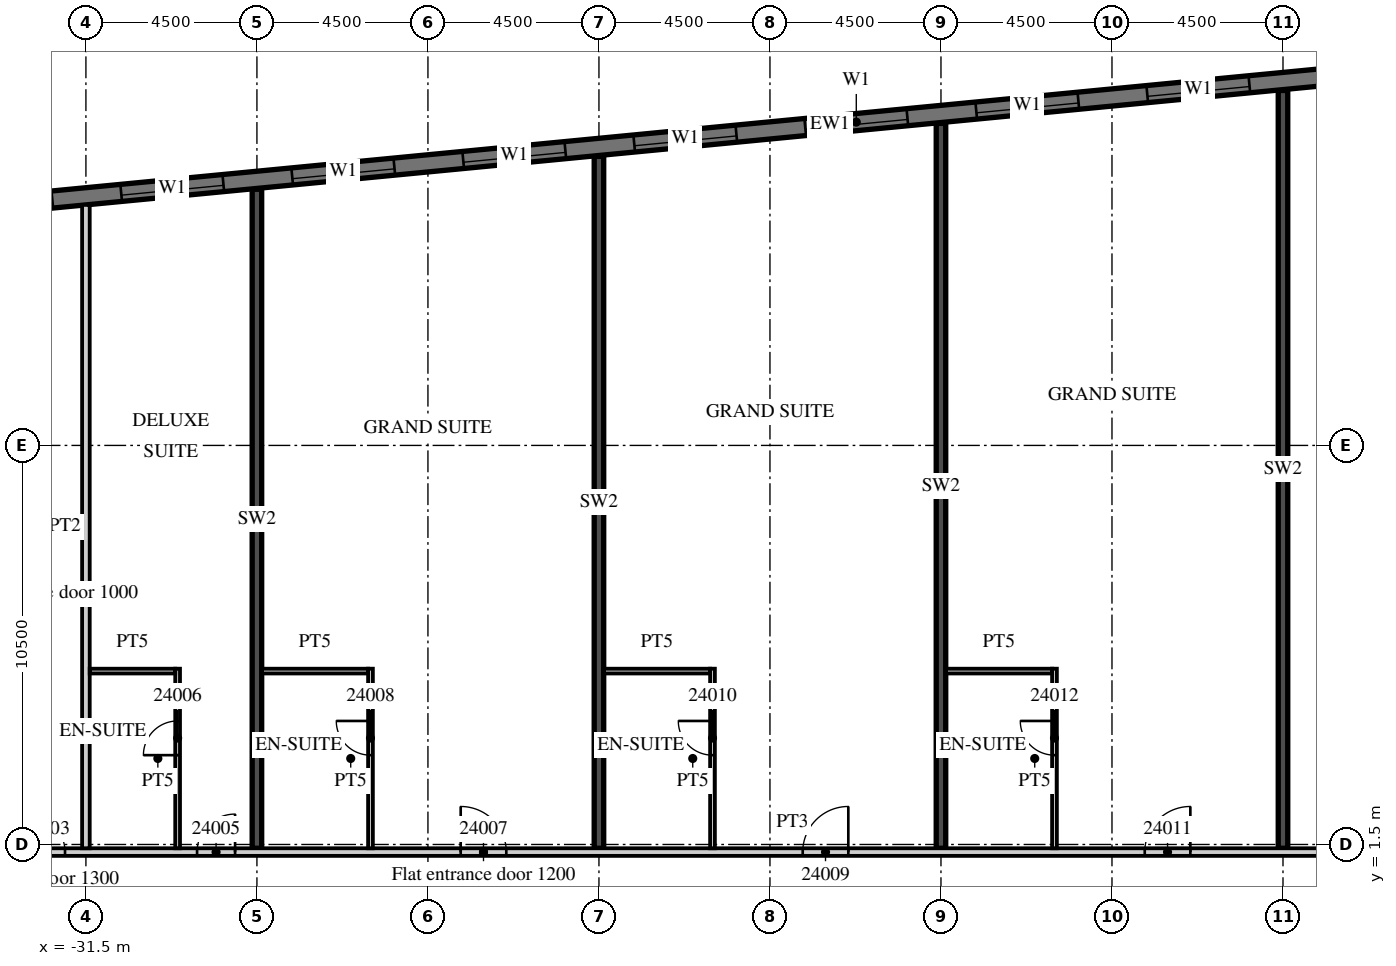
"""IFC4 building model, lengths in metres.
Left out: names, types, materials, properties, quantities, classifications, styles, units other than length and angle.
Written with IfcOpenShell. Run it as: python <this file> out.ifc"""

import sys

from ifc_helpers import new_model, si_unit, direction, frame, frame_2d, origin, place, context, subcontext, project, spatial, rectangle, extrude, element, fill, save


model = new_model("IFC4")
c1 = context("Model", 3, precision=1e-05, world=origin(), true_north=direction((0.0, 1.0)))
c2 = subcontext(c1, "Body", "Model", "MODEL_VIEW")
j1 = project(units=[si_unit("LENGTHUNIT", "METRE"), si_unit("PLANEANGLEUNIT", "RADIAN")], contexts=[c1])
p1 = place(None, origin())
s1 = spatial("IfcSite", under=j1, at=p1, CompositionType="ELEMENT")
p2 = place(p1, origin())
s2 = spatial("IfcBuilding", under=s1, at=p2, CompositionType="ELEMENT")
p3 = place(p2, frame((0.0, 0.0, 114.1)))
s3 = spatial("IfcBuildingStorey", under=s2, at=p3, CompositionType="ELEMENT", Elevation=114.1)
p4 = place(p3, frame((-27.0, 1.4, 0.0), z_axis=(0.0, 0.0, 1.0), x_axis=(0.0, 1.0, 0.0)))
e1 = element("IfcWall", 1, at=p4, inside=s3, PredefinedType="SHEAR", context=c2, shape_type="SweptSolid", body=[
    extrude(rectangle(XDim=17.34, YDim=0.25, at=frame_2d((8.67, 0.0))), origin(), (0.0, 0.0, 1.0), 3.3),
])
p5 = place(p3, frame((-18.0, 1.4, 0.0), z_axis=(0.0, 0.0, 1.0), x_axis=(0.0, 1.0, 0.0)))
e2 = element("IfcWall", 2, at=p5, inside=s3, PredefinedType="SHEAR", context=c2, shape_type="SweptSolid", body=[
    extrude(rectangle(XDim=18.207, YDim=0.25, at=frame_2d((9.104, 0.0))), origin(), (0.0, 0.0, 1.0), 3.3),
])
p6 = place(p3, frame((-9.0, 1.4, 0.0), z_axis=(0.0, 0.0, 1.0), x_axis=(0.0, 1.0, 0.0)))
e3 = element("IfcWall", 3, at=p6, inside=s3, PredefinedType="SHEAR", context=c2, shape_type="SweptSolid", body=[
    extrude(rectangle(XDim=19.073, YDim=0.25, at=frame_2d((9.537, 0.0))), origin(), (0.0, 0.0, 1.0), 3.3),
])
p7 = place(p3, frame((0.0, 1.4, 0.0), z_axis=(0.0, 0.0, 1.0), x_axis=(0.0, 1.0, 0.0)))
e4 = element("IfcWall", 4, at=p7, inside=s3, PredefinedType="SHEAR", context=c2, shape_type="SweptSolid", body=[
    extrude(rectangle(XDim=19.94, YDim=0.25, at=frame_2d((9.97, 0.0))), origin(), (0.0, 0.0, 1.0), 3.3),
])
p8 = place(p3, frame((13.521, 22.89, 0.0), z_axis=(0.0, 0.0, 1.0), x_axis=(-0.995396445054, -0.095843190545, 0.0)))
e5 = element("IfcWall", 5, at=p8, inside=s3, PredefinedType="SOLIDWALL", context=c2, shape_type="SweptSolid", body=[
    extrude(rectangle(XDim=51.114, YDim=0.45, at=frame_2d((25.557, 0.0))), origin(), (0.0, 0.0, 1.0), 3.02),
])
p9 = place(p8, frame((0.91, 0.0, 0.45)))
e6 = element("IfcOpeningElement", 6, at=p9, cuts=e5, PredefinedType="OPENING", context=c2, shape_type="SweptSolid", body=[
    extrude(rectangle(XDim=2.7, YDim=2.25, at=frame_2d((1.35, 1.125))), frame((0.0, 0.235, 0.0), z_axis=(0.0, -1.0, 0.0), x_axis=(1.0, 0.0, 0.0)), (0.0, 0.0, 1.0), 0.47),
])
p10 = place(p8, frame((5.431, 0.0, 0.45)))
e7 = element("IfcOpeningElement", 7, at=p10, cuts=e5, PredefinedType="OPENING", context=c2, shape_type="SweptSolid", body=[
    extrude(rectangle(XDim=2.7, YDim=2.25, at=frame_2d((1.35, 1.125))), frame((0.0, 0.235, 0.0), z_axis=(0.0, -1.0, 0.0), x_axis=(1.0, 0.0, 0.0)), (0.0, 0.0, 1.0), 0.47),
])
p11 = place(p8, frame((9.952, 0.0, 0.45)))
e8 = element("IfcOpeningElement", 8, at=p11, cuts=e5, PredefinedType="OPENING", context=c2, shape_type="SweptSolid", body=[
    extrude(rectangle(XDim=2.7, YDim=2.25, at=frame_2d((1.35, 1.125))), frame((0.0, 0.235, 0.0), z_axis=(0.0, -1.0, 0.0), x_axis=(1.0, 0.0, 0.0)), (0.0, 0.0, 1.0), 0.47),
])
p12 = place(p8, frame((14.473, 0.0, 0.45)))
e9 = element("IfcOpeningElement", 9, at=p12, cuts=e5, PredefinedType="OPENING", context=c2, shape_type="SweptSolid", body=[
    extrude(rectangle(XDim=2.7, YDim=2.25, at=frame_2d((1.35, 1.125))), frame((0.0, 0.235, 0.0), z_axis=(0.0, -1.0, 0.0), x_axis=(1.0, 0.0, 0.0)), (0.0, 0.0, 1.0), 0.47),
])
p13 = place(p8, frame((18.994, 0.0, 0.45)))
e10 = element("IfcOpeningElement", 10, at=p13, cuts=e5, PredefinedType="OPENING", context=c2, shape_type="SweptSolid", body=[
    extrude(rectangle(XDim=2.7, YDim=2.25, at=frame_2d((1.35, 1.125))), frame((0.0, 0.235, 0.0), z_axis=(0.0, -1.0, 0.0), x_axis=(1.0, 0.0, 0.0)), (0.0, 0.0, 1.0), 0.47),
])
p14 = place(p8, frame((23.514, 0.0, 0.45)))
e11 = element("IfcOpeningElement", 11, at=p14, cuts=e5, PredefinedType="OPENING", context=c2, shape_type="SweptSolid", body=[
    extrude(rectangle(XDim=2.7, YDim=2.25, at=frame_2d((1.35, 1.125))), frame((0.0, 0.235, 0.0), z_axis=(0.0, -1.0, 0.0), x_axis=(1.0, 0.0, 0.0)), (0.0, 0.0, 1.0), 0.47),
])
p15 = place(p8, frame((28.035, 0.0, 0.45)))
e12 = element("IfcOpeningElement", 12, at=p15, cuts=e5, PredefinedType="OPENING", context=c2, shape_type="SweptSolid", body=[
    extrude(rectangle(XDim=2.7, YDim=2.25, at=frame_2d((1.35, 1.125))), frame((0.0, 0.235, 0.0), z_axis=(0.0, -1.0, 0.0), x_axis=(1.0, 0.0, 0.0)), (0.0, 0.0, 1.0), 0.47),
])
p16 = place(p8, frame((32.556, 0.0, 0.45)))
e13 = element("IfcOpeningElement", 13, at=p16, cuts=e5, PredefinedType="OPENING", context=c2, shape_type="SweptSolid", body=[
    extrude(rectangle(XDim=2.7, YDim=2.25, at=frame_2d((1.35, 1.125))), frame((0.0, 0.235, 0.0), z_axis=(0.0, -1.0, 0.0), x_axis=(1.0, 0.0, 0.0)), (0.0, 0.0, 1.0), 0.47),
])
p17 = place(p8, frame((37.077, 0.0, 0.45)))
e14 = element("IfcOpeningElement", 14, at=p17, cuts=e5, PredefinedType="OPENING", context=c2, shape_type="SweptSolid", body=[
    extrude(rectangle(XDim=2.7, YDim=2.25, at=frame_2d((1.35, 1.125))), frame((0.0, 0.235, 0.0), z_axis=(0.0, -1.0, 0.0), x_axis=(1.0, 0.0, 0.0)), (0.0, 0.0, 1.0), 0.47),
])
p18 = place(p8, frame((41.598, 0.0, 0.45)))
e15 = element("IfcOpeningElement", 15, at=p18, cuts=e5, PredefinedType="OPENING", context=c2, shape_type="SweptSolid", body=[
    extrude(rectangle(XDim=2.7, YDim=2.25, at=frame_2d((1.35, 1.125))), frame((0.0, 0.235, 0.0), z_axis=(0.0, -1.0, 0.0), x_axis=(1.0, 0.0, 0.0)), (0.0, 0.0, 1.0), 0.47),
])
p19 = place(p8, frame((46.118, 0.0, 0.45)))
e16 = element("IfcOpeningElement", 16, at=p19, cuts=e5, PredefinedType="OPENING", context=c2, shape_type="SweptSolid", body=[
    extrude(rectangle(XDim=2.7, YDim=2.25, at=frame_2d((1.35, 1.125))), frame((0.0, 0.235, 0.0), z_axis=(0.0, -1.0, 0.0), x_axis=(1.0, 0.0, 0.0)), (0.0, 0.0, 1.0), 0.47),
])
p20 = place(p3, frame((-39.316, 1.3, 0.0), z_axis=(0.0, 0.0, 1.0), x_axis=(1.0, 0.0, 0.0)))
e17 = element("IfcWall", 17, at=p20, inside=s3, PredefinedType="PARTITIONING", context=c2, shape_type="SweptSolid", body=[
    extrude(rectangle(XDim=52.816, YDim=0.2, at=frame_2d((26.408, 0.0))), origin(), (0.0, 0.0, 1.0), 3.02),
])
p21 = place(p20, frame((0.15, 0.0, 0.0)))
e18 = element("IfcOpeningElement", 18, at=p21, cuts=e17, PredefinedType="OPENING", context=c2, shape_type="SweptSolid", body=[
    extrude(rectangle(XDim=0.9, YDim=2.1, at=frame_2d((0.45, 1.05))), frame((0.0, 0.11, 0.0), z_axis=(0.0, -1.0, 0.0), x_axis=(1.0, 0.0, 0.0)), (0.0, 0.0, 1.0), 0.22),
])
p22 = place(p20, frame((6.266, 0.0, 0.0)))
e19 = element("IfcOpeningElement", 19, at=p22, cuts=e17, PredefinedType="OPENING", context=c2, shape_type="SweptSolid", body=[
    extrude(rectangle(XDim=1.0, YDim=2.1, at=frame_2d((0.5, 1.05))), frame((0.0, 0.11, 0.0), z_axis=(0.0, -1.0, 0.0), x_axis=(1.0, 0.0, 0.0)), (0.0, 0.0, 1.0), 0.22),
])
p23 = place(p20, frame((10.741, 0.0, 0.0)))
e20 = element("IfcOpeningElement", 20, at=p23, cuts=e17, PredefinedType="OPENING", context=c2, shape_type="SweptSolid", body=[
    extrude(rectangle(XDim=1.0, YDim=2.1, at=frame_2d((0.5, 1.05))), frame((0.0, 0.11, 0.0), z_axis=(0.0, -1.0, 0.0), x_axis=(1.0, 0.0, 0.0)), (0.0, 0.0, 1.0), 0.22),
])
p24 = place(p20, frame((17.678, 0.0, 0.0)))
e21 = element("IfcOpeningElement", 21, at=p24, cuts=e17, PredefinedType="OPENING", context=c2, shape_type="SweptSolid", body=[
    extrude(rectangle(XDim=1.2, YDim=2.1, at=frame_2d((0.6, 1.05))), frame((0.0, 0.11, 0.0), z_axis=(0.0, -1.0, 0.0), x_axis=(1.0, 0.0, 0.0)), (0.0, 0.0, 1.0), 0.22),
])
p25 = place(p20, frame((26.678, 0.0, 0.0)))
e22 = element("IfcOpeningElement", 22, at=p25, cuts=e17, PredefinedType="OPENING", context=c2, shape_type="SweptSolid", body=[
    extrude(rectangle(XDim=1.2, YDim=2.1, at=frame_2d((0.6, 1.05))), frame((0.0, 0.11, 0.0), z_axis=(0.0, -1.0, 0.0), x_axis=(1.0, 0.0, 0.0)), (0.0, 0.0, 1.0), 0.22),
])
p26 = place(p20, frame((35.678, 0.0, 0.0)))
e23 = element("IfcOpeningElement", 23, at=p26, cuts=e17, PredefinedType="OPENING", context=c2, shape_type="SweptSolid", body=[
    extrude(rectangle(XDim=1.2, YDim=2.1, at=frame_2d((0.6, 1.05))), frame((0.0, 0.11, 0.0), z_axis=(0.0, -1.0, 0.0), x_axis=(1.0, 0.0, 0.0)), (0.0, 0.0, 1.0), 0.22),
])
p27 = place(p20, frame((41.754, 0.0, 0.0)))
e24 = element("IfcOpeningElement", 24, at=p27, cuts=e17, PredefinedType="OPENING", context=c2, shape_type="SweptSolid", body=[
    extrude(rectangle(XDim=1.2, YDim=2.1, at=frame_2d((0.6, 1.05))), frame((0.0, 0.11, 0.0), z_axis=(0.0, -1.0, 0.0), x_axis=(1.0, 0.0, 0.0)), (0.0, 0.0, 1.0), 0.22),
])
p28 = place(p20, frame((51.241, 0.0, 0.0)))
e25 = element("IfcOpeningElement", 25, at=p28, cuts=e17, PredefinedType="OPENING", context=c2, shape_type="SweptSolid", body=[
    extrude(rectangle(XDim=1.0, YDim=2.1, at=frame_2d((0.5, 1.05))), frame((0.0, 0.11, 0.0), z_axis=(0.0, -1.0, 0.0), x_axis=(1.0, 0.0, 0.0)), (0.0, 0.0, 1.0), 0.22),
])
p29 = place(p3, frame((-31.5, 1.4, 0.0), z_axis=(0.0, 0.0, 1.0), x_axis=(0.0, 1.0, 0.0)))
e26 = element("IfcWall", 26, at=p29, inside=s3, PredefinedType="PARTITIONING", context=c2, shape_type="SweptSolid", body=[
    extrude(rectangle(XDim=16.929, YDim=0.2, at=frame_2d((8.465, 0.0))), origin(), (0.0, 0.0, 1.0), 3.02),
])
p30 = place(p3, frame((-29.087, 1.4, 0.0), z_axis=(0.0, 0.0, 1.0), x_axis=(0.0, 1.0, 0.0)))
e27 = element("IfcWall", 27, at=p30, inside=s3, PredefinedType="PARTITIONING", context=c2, shape_type="SweptSolid", body=[
    extrude(rectangle(XDim=4.725, YDim=0.125, at=frame_2d((2.363, 0.0))), origin(), (0.0, 0.0, 1.0), 3.02),
])
p31 = place(p30, frame((2.45, 0.0, 0.0)))
e28 = element("IfcOpeningElement", 28, at=p31, cuts=e27, PredefinedType="OPENING", context=c2, shape_type="SweptSolid", body=[
    extrude(rectangle(XDim=0.9, YDim=2.1, at=frame_2d((0.45, 1.05))), frame((0.0, 0.073, 0.0), z_axis=(0.0, -1.0, 0.0), x_axis=(1.0, 0.0, 0.0)), (0.0, 0.0, 1.0), 0.145),
])
p32 = place(p3, frame((-31.4, 6.062, 0.0), z_axis=(0.0, 0.0, 1.0), x_axis=(1.0, 0.0, 0.0)))
e29 = element("IfcWall", 29, at=p32, inside=s3, PredefinedType="PARTITIONING", context=c2, shape_type="SweptSolid", body=[
    extrude(rectangle(XDim=2.25, YDim=0.125, at=frame_2d((1.125, 0.0))), origin(), (0.0, 0.0, 1.0), 3.02),
])
p33 = place(p3, frame((-24.012, 1.4, 0.0), z_axis=(0.0, 0.0, 1.0), x_axis=(0.0, 1.0, 0.0)))
e30 = element("IfcWall", 30, at=p33, inside=s3, PredefinedType="PARTITIONING", context=c2, shape_type="SweptSolid", body=[
    extrude(rectangle(XDim=4.725, YDim=0.125, at=frame_2d((2.363, 0.0))), origin(), (0.0, 0.0, 1.0), 3.02),
])
p34 = place(p33, frame((2.45, 0.0, 0.0)))
e31 = element("IfcOpeningElement", 31, at=p34, cuts=e30, PredefinedType="OPENING", context=c2, shape_type="SweptSolid", body=[
    extrude(rectangle(XDim=0.9, YDim=2.1, at=frame_2d((0.45, 1.05))), frame((0.0, 0.073, 0.0), z_axis=(0.0, -1.0, 0.0), x_axis=(1.0, 0.0, 0.0)), (0.0, 0.0, 1.0), 0.145),
])
p35 = place(p3, frame((-26.875, 6.062, 0.0), z_axis=(0.0, 0.0, 1.0), x_axis=(1.0, 0.0, 0.0)))
e32 = element("IfcWall", 32, at=p35, inside=s3, PredefinedType="PARTITIONING", context=c2, shape_type="SweptSolid", body=[
    extrude(rectangle(XDim=2.8, YDim=0.125, at=frame_2d((1.4, 0.0))), origin(), (0.0, 0.0, 1.0), 3.02),
])
p36 = place(p3, frame((-15.012, 1.4, 0.0), z_axis=(0.0, 0.0, 1.0), x_axis=(0.0, 1.0, 0.0)))
e33 = element("IfcWall", 33, at=p36, inside=s3, PredefinedType="PARTITIONING", context=c2, shape_type="SweptSolid", body=[
    extrude(rectangle(XDim=4.725, YDim=0.125, at=frame_2d((2.363, 0.0))), origin(), (0.0, 0.0, 1.0), 3.02),
])
p37 = place(p36, frame((2.45, 0.0, 0.0)))
e34 = element("IfcOpeningElement", 34, at=p37, cuts=e33, PredefinedType="OPENING", context=c2, shape_type="SweptSolid", body=[
    extrude(rectangle(XDim=0.9, YDim=2.1, at=frame_2d((0.45, 1.05))), frame((0.0, 0.073, 0.0), z_axis=(0.0, -1.0, 0.0), x_axis=(1.0, 0.0, 0.0)), (0.0, 0.0, 1.0), 0.145),
])
p38 = place(p3, frame((-17.875, 6.062, 0.0), z_axis=(0.0, 0.0, 1.0), x_axis=(1.0, 0.0, 0.0)))
e35 = element("IfcWall", 35, at=p38, inside=s3, PredefinedType="PARTITIONING", context=c2, shape_type="SweptSolid", body=[
    extrude(rectangle(XDim=2.8, YDim=0.125, at=frame_2d((1.4, 0.0))), origin(), (0.0, 0.0, 1.0), 3.02),
])
p39 = place(p3, frame((-6.013, 1.4, 0.0), z_axis=(0.0, 0.0, 1.0), x_axis=(0.0, 1.0, 0.0)))
e36 = element("IfcWall", 36, at=p39, inside=s3, PredefinedType="PARTITIONING", context=c2, shape_type="SweptSolid", body=[
    extrude(rectangle(XDim=4.725, YDim=0.125, at=frame_2d((2.363, 0.0))), origin(), (0.0, 0.0, 1.0), 3.02),
])
p40 = place(p39, frame((2.45, 0.0, 0.0)))
e37 = element("IfcOpeningElement", 37, at=p40, cuts=e36, PredefinedType="OPENING", context=c2, shape_type="SweptSolid", body=[
    extrude(rectangle(XDim=0.9, YDim=2.1, at=frame_2d((0.45, 1.05))), frame((0.0, 0.073, 0.0), z_axis=(0.0, -1.0, 0.0), x_axis=(1.0, 0.0, 0.0)), (0.0, 0.0, 1.0), 0.145),
])
p41 = place(p3, frame((-8.875, 6.062, 0.0), z_axis=(0.0, 0.0, 1.0), x_axis=(1.0, 0.0, 0.0)))
e38 = element("IfcWall", 38, at=p41, inside=s3, PredefinedType="PARTITIONING", context=c2, shape_type="SweptSolid", body=[
    extrude(rectangle(XDim=2.8, YDim=0.125, at=frame_2d((1.4, 0.0))), origin(), (0.0, 0.0, 1.0), 3.02),
])
p42 = place(p12, origin())
e39 = element("IfcWindow", 39, at=p42, inside=s3, PartitioningType="SINGLE_PANEL", PredefinedType="WINDOW", context=c2, shape_type="SweptSolid", body=[
    extrude(rectangle(XDim=2.7, YDim=2.25, at=frame_2d((1.35, 1.125))), frame((0.0, 0.09, 0.0), z_axis=(0.0, -1.0, 0.0), x_axis=(1.0, 0.0, 0.0)), (0.0, 0.0, 1.0), 0.06),
])
fill(e9, e39)
p43 = place(p13, origin())
e40 = element("IfcWindow", 40, at=p43, inside=s3, PartitioningType="SINGLE_PANEL", PredefinedType="WINDOW", context=c2, shape_type="SweptSolid", body=[
    extrude(rectangle(XDim=2.7, YDim=2.25, at=frame_2d((1.35, 1.125))), frame((0.0, 0.09, 0.0), z_axis=(0.0, -1.0, 0.0), x_axis=(1.0, 0.0, 0.0)), (0.0, 0.0, 1.0), 0.06),
])
fill(e10, e40)
p44 = place(p14, origin())
e41 = element("IfcWindow", 41, at=p44, inside=s3, PartitioningType="SINGLE_PANEL", PredefinedType="WINDOW", context=c2, shape_type="SweptSolid", body=[
    extrude(rectangle(XDim=2.7, YDim=2.25, at=frame_2d((1.35, 1.125))), frame((0.0, 0.09, 0.0), z_axis=(0.0, -1.0, 0.0), x_axis=(1.0, 0.0, 0.0)), (0.0, 0.0, 1.0), 0.06),
])
fill(e11, e41)
p45 = place(p15, origin())
e42 = element("IfcWindow", 42, at=p45, inside=s3, PartitioningType="SINGLE_PANEL", PredefinedType="WINDOW", context=c2, shape_type="SweptSolid", body=[
    extrude(rectangle(XDim=2.7, YDim=2.25, at=frame_2d((1.35, 1.125))), frame((0.0, 0.09, 0.0), z_axis=(0.0, -1.0, 0.0), x_axis=(1.0, 0.0, 0.0)), (0.0, 0.0, 1.0), 0.06),
])
fill(e12, e42)
p46 = place(p16, origin())
e43 = element("IfcWindow", 43, at=p46, inside=s3, PartitioningType="SINGLE_PANEL", PredefinedType="WINDOW", context=c2, shape_type="SweptSolid", body=[
    extrude(rectangle(XDim=2.7, YDim=2.25, at=frame_2d((1.35, 1.125))), frame((0.0, 0.09, 0.0), z_axis=(0.0, -1.0, 0.0), x_axis=(1.0, 0.0, 0.0)), (0.0, 0.0, 1.0), 0.06),
])
fill(e13, e43)
p47 = place(p17, origin())
e44 = element("IfcWindow", 44, at=p47, inside=s3, PartitioningType="SINGLE_PANEL", PredefinedType="WINDOW", context=c2, shape_type="SweptSolid", body=[
    extrude(rectangle(XDim=2.7, YDim=2.25, at=frame_2d((1.35, 1.125))), frame((0.0, 0.09, 0.0), z_axis=(0.0, -1.0, 0.0), x_axis=(1.0, 0.0, 0.0)), (0.0, 0.0, 1.0), 0.06),
])
fill(e14, e44)
p48 = place(p18, origin())
e45 = element("IfcWindow", 45, at=p48, inside=s3, PartitioningType="SINGLE_PANEL", PredefinedType="WINDOW", context=c2, shape_type="SweptSolid", body=[
    extrude(rectangle(XDim=2.7, YDim=2.25, at=frame_2d((1.35, 1.125))), frame((0.0, 0.09, 0.0), z_axis=(0.0, -1.0, 0.0), x_axis=(1.0, 0.0, 0.0)), (0.0, 0.0, 1.0), 0.06),
])
fill(e15, e45)
p49 = place(p19, origin())
e46 = element("IfcWindow", 46, at=p49, inside=s3, PartitioningType="SINGLE_PANEL", PredefinedType="WINDOW", context=c2, shape_type="SweptSolid", body=[
    extrude(rectangle(XDim=2.7, YDim=2.25, at=frame_2d((1.35, 1.125))), frame((0.0, 0.09, 0.0), z_axis=(0.0, -1.0, 0.0), x_axis=(1.0, 0.0, 0.0)), (0.0, 0.0, 1.0), 0.06),
])
fill(e16, e46)
p50 = place(p22, origin())
e47 = element("IfcDoor", 47, at=p50, inside=s3, OperationType="SINGLE_SWING_LEFT", PredefinedType="DOOR", context=c2, shape_type="SweptSolid", body=[
    extrude(rectangle(XDim=1.0, YDim=2.1, at=frame_2d((0.5, 1.05))), frame((0.0, 0.025, 0.0), z_axis=(0.0, -1.0, 0.0), x_axis=(1.0, 0.0, 0.0)), (0.0, 0.0, 1.0), 0.05),
])
fill(e19, e47)
p51 = place(p23, origin())
e48 = element("IfcDoor", 48, at=p51, inside=s3, OperationType="SINGLE_SWING_RIGHT", PredefinedType="DOOR", context=c2, shape_type="SweptSolid", body=[
    extrude(rectangle(XDim=1.0, YDim=2.1, at=frame_2d((0.5, 1.05))), frame((0.0, 0.025, 0.0), z_axis=(0.0, -1.0, 0.0), x_axis=(1.0, 0.0, 0.0)), (0.0, 0.0, 1.0), 0.05),
])
fill(e20, e48)
p52 = place(p31, origin())
e49 = element("IfcDoor", 49, at=p52, inside=s3, OperationType="SINGLE_SWING_LEFT", PredefinedType="DOOR", context=c2, shape_type="SweptSolid", body=[
    extrude(rectangle(XDim=0.9, YDim=2.1, at=frame_2d((0.45, 1.05))), frame((0.0, 0.025, 0.0), z_axis=(0.0, -1.0, 0.0), x_axis=(1.0, 0.0, 0.0)), (0.0, 0.0, 1.0), 0.05),
])
fill(e28, e49)
p53 = place(p24, origin())
e50 = element("IfcDoor", 50, at=p53, inside=s3, OperationType="SINGLE_SWING_LEFT", PredefinedType="DOOR", context=c2, shape_type="SweptSolid", body=[
    extrude(rectangle(XDim=1.2, YDim=2.1, at=frame_2d((0.6, 1.05))), frame((0.0, 0.025, 0.0), z_axis=(0.0, -1.0, 0.0), x_axis=(1.0, 0.0, 0.0)), (0.0, 0.0, 1.0), 0.05),
])
fill(e21, e50)
p54 = place(p34, origin())
e51 = element("IfcDoor", 51, at=p54, inside=s3, OperationType="SINGLE_SWING_RIGHT", PredefinedType="DOOR", context=c2, shape_type="SweptSolid", body=[
    extrude(rectangle(XDim=0.9, YDim=2.1, at=frame_2d((0.45, 1.05))), frame((0.0, 0.025, 0.0), z_axis=(0.0, -1.0, 0.0), x_axis=(1.0, 0.0, 0.0)), (0.0, 0.0, 1.0), 0.05),
])
fill(e31, e51)
p55 = place(p25, origin())
e52 = element("IfcDoor", 52, at=p55, inside=s3, OperationType="SINGLE_SWING_RIGHT", PredefinedType="DOOR", context=c2, shape_type="SweptSolid", body=[
    extrude(rectangle(XDim=1.2, YDim=2.1, at=frame_2d((0.6, 1.05))), frame((0.0, 0.025, 0.0), z_axis=(0.0, -1.0, 0.0), x_axis=(1.0, 0.0, 0.0)), (0.0, 0.0, 1.0), 0.05),
])
fill(e22, e52)
p56 = place(p37, origin())
e53 = element("IfcDoor", 53, at=p56, inside=s3, OperationType="SINGLE_SWING_RIGHT", PredefinedType="DOOR", context=c2, shape_type="SweptSolid", body=[
    extrude(rectangle(XDim=0.9, YDim=2.1, at=frame_2d((0.45, 1.05))), frame((0.0, 0.025, 0.0), z_axis=(0.0, -1.0, 0.0), x_axis=(1.0, 0.0, 0.0)), (0.0, 0.0, 1.0), 0.05),
])
fill(e34, e53)
p57 = place(p26, origin())
e54 = element("IfcDoor", 54, at=p57, inside=s3, OperationType="SINGLE_SWING_RIGHT", PredefinedType="DOOR", context=c2, shape_type="SweptSolid", body=[
    extrude(rectangle(XDim=1.2, YDim=2.1, at=frame_2d((0.6, 1.05))), frame((0.0, 0.025, 0.0), z_axis=(0.0, -1.0, 0.0), x_axis=(1.0, 0.0, 0.0)), (0.0, 0.0, 1.0), 0.05),
])
fill(e23, e54)
p58 = place(p40, origin())
e55 = element("IfcDoor", 55, at=p58, inside=s3, OperationType="SINGLE_SWING_RIGHT", PredefinedType="DOOR", context=c2, shape_type="SweptSolid", body=[
    extrude(rectangle(XDim=0.9, YDim=2.1, at=frame_2d((0.45, 1.05))), frame((0.0, 0.025, 0.0), z_axis=(0.0, -1.0, 0.0), x_axis=(1.0, 0.0, 0.0)), (0.0, 0.0, 1.0), 0.05),
])
fill(e37, e55)
save(model, sys.argv[1])
